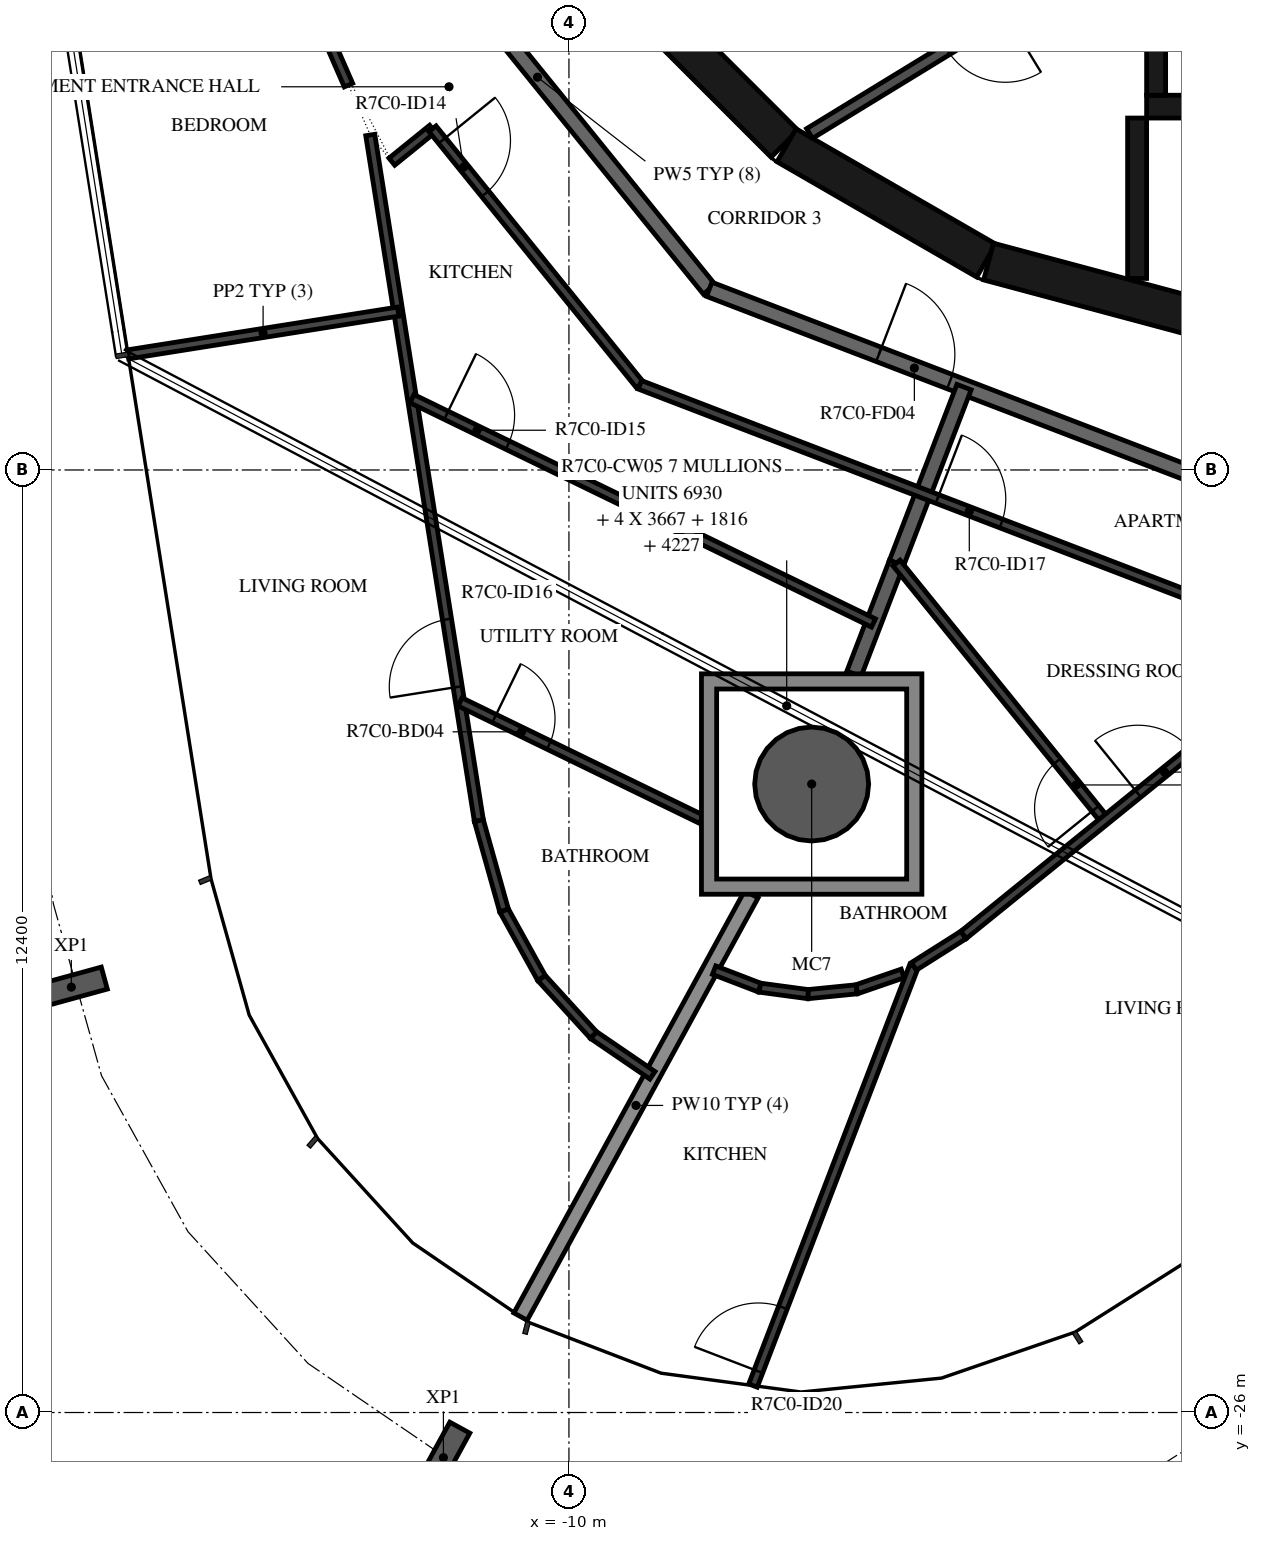
"""IFC4 building model, lengths in metres.
Left out: names, types, materials, properties, quantities, classifications, styles, units other than length and angle.
Written with IfcOpenShell. Run it as: python <this file> out.ifc"""

import sys

from ifc_helpers import new_model, si_unit, direction, frame, frame_2d, origin, origin_2d, place, context, subcontext, project, spatial, polyline, rectangle, hollow_circle, i_section, outline, extrude, element, fill, save


model = new_model("IFC4")
c1 = context("Model", 3, precision=1e-05, world=origin(), true_north=direction((0.0, 1.0)))
c2 = subcontext(c1, "Body", "Model", "MODEL_VIEW")
j1 = project(units=[si_unit("LENGTHUNIT", "METRE"), si_unit("PLANEANGLEUNIT", "RADIAN")], contexts=[c1])
p1 = place(None, origin())
s1 = spatial("IfcSite", under=j1, at=p1, CompositionType="ELEMENT")
p2 = place(p1, origin())
s2 = spatial("IfcBuilding", under=s1, at=p2, CompositionType="ELEMENT")
p3 = place(p2, frame((0.0, 0.0, 284.4)))
s3 = spatial("IfcBuildingStorey", under=s2, at=p3, CompositionType="ELEMENT", Elevation=284.4)
p4 = place(p3, frame((-6.807, -17.732, -0.38), z_axis=(0.0, 0.0, 1.0), x_axis=(1.0, 0.0, 0.0)))
e1 = element("IfcColumn", 1, at=p4, inside=s3, PredefinedType="COLUMN", context=c2, shape_type="SweptSolid", body=[
    extrude(hollow_circle(Radius=0.75, WallThickness=0.035, at=origin_2d()), origin(), (0.0, 0.0, 1.0), 3.5),
])
for number, where, z_axis, x_axis in (
    (2, (-16.547, -20.404, -0.38), (0.0, 0.0, 1.0), (-0.265, 0.964, 0.0)),
    (3, (-11.652, -26.594, -0.38), (0.0, 0.0, 1.0), (-0.877, 0.48, 0.0)),
):
    element("IfcColumn", number, at=place(p3, frame(where, z_axis=z_axis, x_axis=x_axis)), inside=s3, PredefinedType="COLUMN", context=c2, shape_type="SweptSolid", body=[
        extrude(i_section(OverallWidth=0.3, OverallDepth=0.9, WebThickness=0.019, FlangeThickness=0.035, FilletRadius=0.03, at=origin_2d()), origin(), (0.0, 0.0, 1.0), 3.5),
    ])
p5 = place(p3, frame((-9.308, -7.164, 0.0), z_axis=(0.0, 0.0, 1.0), x_axis=(0.707106781187, -0.707106781187, 0.0)))
e4 = element("IfcWall", 4, at=p5, inside=s3, PredefinedType="SHEAR", context=c2, shape_type="SweptSolid", body=[
    extrude(rectangle(XDim=3.032, YDim=0.5, at=frame_2d((1.516, 0.0))), origin(), (0.0, 0.0, 1.0), 3.12),
])
for number, where, z_axis, x_axis in (
    (5, (-7.137, -9.329, 0.0), (0.0, 0.0, 1.0), (0.866, -0.5, 0.0)),
    (6, (-4.479, -10.858, 0.0), (0.0, 0.0, 1.0), (0.966, -0.259, 0.0)),
):
    element("IfcWall", number, at=place(p3, frame(where, z_axis=z_axis, x_axis=x_axis)), inside=s3, PredefinedType="SHEAR", context=c2, shape_type="SweptSolid", body=[
        extrude(rectangle(XDim=3.033, YDim=0.5, at=frame_2d((1.516, 0.0))), origin(), (0.0, 0.0, 1.0), 3.12),
    ])
p6 = place(p3, frame((-2.275, -8.67, 0.0), z_axis=(0.0, 0.0, 1.0), x_axis=(0.0, 1.0, 0.0)))
e7 = element("IfcWall", 7, at=p6, inside=s3, PredefinedType="SHEAR", context=c2, shape_type="SweptSolid", body=[
    extrude(rectangle(XDim=3.32, YDim=0.25, at=frame_2d((1.66, 0.0))), origin(), (0.0, 0.0, 1.0), 3.12),
])
p7 = place(p3, frame((-2.4, -8.82, 0.0), z_axis=(0.0, 0.0, 1.0), x_axis=(1.0, 0.0, 0.0)))
e8 = element("IfcWall", 8, at=p7, inside=s3, PredefinedType="SHEAR", context=c2, shape_type="SweptSolid", body=[
    extrude(rectangle(XDim=2.5, YDim=0.3, at=frame_2d((1.25, 0.0))), origin(), (0.0, 0.0, 1.0), 3.12),
])
p8 = place(p7, frame((0.65, 0.0, 0.0)))
e9 = element("IfcOpeningElement", 9, at=p8, cuts=e8, PredefinedType="OPENING", context=c2, shape_type="SweptSolid", body=[
    extrude(rectangle(XDim=1.2, YDim=2.1, at=frame_2d((0.6, 1.05))), frame((0.0, 0.16, 0.0), z_axis=(0.0, -1.0, 0.0), x_axis=(1.0, 0.0, 0.0)), (0.0, 0.0, 1.0), 0.32),
])
p9 = place(p3, frame((-2.525, -8.97, 0.0), z_axis=(0.0, 0.0, 1.0), x_axis=(0.0, -1.0, 0.0)))
e10 = element("IfcWall", 10, at=p9, inside=s3, PredefinedType="SHEAR", context=c2, shape_type="SweptSolid", body=[
    extrude(rectangle(XDim=2.11, YDim=0.25, at=frame_2d((1.055, 0.0))), origin(), (0.0, 0.0, 1.0), 3.12),
])
p10 = place(p3, frame((-2.451, -6.495, 0.0), z_axis=(0.0, 0.0, 1.0), x_axis=(-0.853250115418, -0.521501908471, 0.0)))
e11 = element("IfcWall", 11, at=p10, inside=s3, PredefinedType="PARTITIONING", context=c2, shape_type="SweptSolid", body=[
    extrude(rectangle(XDim=5.137, YDim=0.15, at=frame_2d((2.569, 0.0))), origin(), (0.0, 0.0, 1.0), 3.12),
])
p11 = place(p10, frame((2.119, 0.0, 0.0)))
e12 = element("IfcOpeningElement", 12, at=p11, cuts=e11, PredefinedType="OPENING", context=c2, shape_type="SweptSolid", body=[
    extrude(rectangle(XDim=0.9, YDim=2.1, at=frame_2d((0.45, 1.05))), frame((0.0, 0.085, 0.0), z_axis=(0.0, -1.0, 0.0), x_axis=(1.0, 0.0, 0.0)), (0.0, 0.0, 1.0), 0.17),
])
p12 = place(p3, frame((-12.673, -5.643, 0.0), z_axis=(0.0, 0.0, 1.0), x_axis=(0.629302871585, -0.777160148113, 0.0)))
e13 = element("IfcWall", 13, at=p12, inside=s3, PredefinedType="STANDARD", context=c2, shape_type="SweptSolid", body=[
    extrude(rectangle(XDim=7.181, YDim=0.2, at=frame_2d((3.59, 0.0))), origin(), (0.0, 0.0, 1.0), 3.12),
])
p13 = place(p3, frame((-8.154, -11.223, 0.0), z_axis=(0.0, 0.0, 1.0), x_axis=(0.93359073609, -0.358341090983, 0.0)))
e14 = element("IfcWall", 14, at=p13, inside=s3, PredefinedType="STANDARD", context=c2, shape_type="SweptSolid", body=[
    extrude(rectangle(XDim=7.181, YDim=0.2, at=frame_2d((3.59, 0.0))), origin(), (0.0, 0.0, 1.0), 3.12),
])
p14 = place(p13, frame((2.39, 0.0, 0.0)))
e15 = element("IfcOpeningElement", 15, at=p14, cuts=e14, PredefinedType="OPENING", context=c2, shape_type="SweptSolid", body=[
    extrude(rectangle(XDim=1.0, YDim=2.1, at=frame_2d((0.5, 1.05))), frame((0.0, 0.11, 0.0), z_axis=(0.0, -1.0, 0.0), x_axis=(1.0, 0.0, 0.0)), (0.0, 0.0, 1.0), 0.22),
])
p15 = place(p3, frame((-5.69, -14.824, 0.0), z_axis=(0.0, 0.0, 1.0), x_axis=(0.358345342952, 0.933589104041, 0.0)))
e16 = element("IfcWall", 16, at=p15, inside=s3, PredefinedType="STANDARD", context=c2, shape_type="SweptSolid", body=[
    extrude(rectangle(XDim=2.479, YDim=0.2, at=frame_2d((1.239, 0.0))), origin(), (0.0, 0.0, 1.0), 3.12),
])
p16 = place(p3, frame((-6.25, -16.282, 0.0), z_axis=(0.0, 0.0, 1.0), x_axis=(0.358360842469, 0.933583154617, 0.0)))
e17 = element("IfcWall", 17, at=p16, inside=s3, PredefinedType="STANDARD", context=c2, shape_type="SweptSolid", body=[
    extrude(rectangle(XDim=1.562, YDim=0.2, at=frame_2d((0.781, 0.0))), origin(), (0.0, 0.0, 1.0), 3.12),
])
p17 = place(p3, frame((-10.637, -24.738, 0.0), z_axis=(0.0, 0.0, 1.0), x_axis=(0.479683887596, 0.877441375808, 0.0)))
e18 = element("IfcWall", 18, at=p17, inside=s3, PredefinedType="STANDARD", context=c2, shape_type="SweptSolid", body=[
    extrude(rectangle(XDim=6.333, YDim=0.2, at=frame_2d((3.166, 0.0))), origin(), (0.0, 0.0, 1.0), 2.73),
])
p18 = place(p3, frame((-13.132, -8.006, 0.0), z_axis=(0.0, 0.0, 1.0), x_axis=(0.400176548656, -0.916438066596, 0.0)))
e19 = element("IfcWall", 19, at=p18, inside=s3, PredefinedType="PARTITIONING", context=c2, shape_type="SweptSolid", body=[
    extrude(rectangle(XDim=0.578, YDim=0.12, at=frame_2d((0.289, 0.0))), origin(), (0.0, 0.0, 1.0), 3.12),
])
p19 = place(p3, frame((-12.33, -9.544, 0.0), z_axis=(0.0, 0.0, 1.0), x_axis=(0.777046524115, 0.629443166109, 0.0)))
e20 = element("IfcWall", 20, at=p19, inside=s3, PredefinedType="PARTITIONING", context=c2, shape_type="SweptSolid", body=[
    extrude(rectangle(XDim=0.688, YDim=0.12, at=frame_2d((0.344, 0.0))), origin(), (0.0, 0.0, 1.0), 3.12),
])
p20 = place(p3, frame((-11.795, -9.111, 0.0), z_axis=(0.0, 0.0, 1.0), x_axis=(0.62936834401, -0.777107127466, 0.0)))
e21 = element("IfcWall", 21, at=p20, inside=s3, PredefinedType="PARTITIONING", context=c2, shape_type="SweptSolid", body=[
    extrude(rectangle(XDim=4.334, YDim=0.12, at=frame_2d((2.167, 0.0))), origin(), (0.0, 0.0, 1.0), 3.12),
])
p21 = place(p20, frame((0.2, 0.0, 0.0)))
e22 = element("IfcOpeningElement", 22, at=p21, cuts=e21, PredefinedType="OPENING", context=c2, shape_type="SweptSolid", body=[
    extrude(rectangle(XDim=0.9, YDim=2.1, at=frame_2d((0.45, 1.05))), frame((0.0, 0.07, 0.0), z_axis=(0.0, -1.0, 0.0), x_axis=(1.0, 0.0, 0.0)), (0.0, 0.0, 1.0), 0.14),
])
p22 = place(p3, frame((-9.067, -12.479, 0.0), z_axis=(0.0, 0.0, 1.0), x_axis=(0.933579449035, -0.358370495911, 0.0)))
e23 = element("IfcWall", 23, at=p22, inside=s3, PredefinedType="PARTITIONING", context=c2, shape_type="SweptSolid", body=[
    extrude(rectangle(XDim=7.985, YDim=0.12, at=frame_2d((3.992, 0.0))), origin(), (0.0, 0.0, 1.0), 3.12),
])
p23 = place(p22, frame((4.192, 0.0, 0.0)))
e24 = element("IfcOpeningElement", 24, at=p23, cuts=e23, PredefinedType="OPENING", context=c2, shape_type="SweptSolid", body=[
    extrude(rectangle(XDim=0.9, YDim=2.1, at=frame_2d((0.45, 1.05))), frame((0.0, 0.07, 0.0), z_axis=(0.0, -1.0, 0.0), x_axis=(1.0, 0.0, 0.0)), (0.0, 0.0, 1.0), 0.14),
])
p24 = place(p3, frame((-11.185, -18.213, 0.0), z_axis=(0.0, 0.0, 1.0), x_axis=(-0.15642108221, 0.987690460134, 0.0)))
e25 = element("IfcWall", 25, at=p24, inside=s3, PredefinedType="PARTITIONING", context=c2, shape_type="SweptSolid", body=[
    extrude(rectangle(XDim=9.132, YDim=0.12, at=frame_2d((4.566, 0.0))), origin(), (0.0, 0.0, 1.0), 3.12),
])
p25 = place(p24, frame((1.781, 0.0, 0.0)))
e26 = element("IfcOpeningElement", 26, at=p25, cuts=e25, PredefinedType="OPENING", context=c2, shape_type="SweptSolid", body=[
    extrude(rectangle(XDim=0.9, YDim=2.1, at=frame_2d((0.45, 1.05))), frame((0.0, 0.07, 0.0), z_axis=(0.0, -1.0, 0.0), x_axis=(1.0, 0.0, 0.0)), (0.0, 0.0, 1.0), 0.14),
])
p26 = place(p3, frame((-15.802, -12.08, 0.0), z_axis=(0.0, 0.0, 1.0), x_axis=(0.987685312069, 0.156453585206, 0.0)))
e27 = element("IfcWall", 27, at=p26, inside=s3, PredefinedType="PARTITIONING", context=c2, shape_type="SweptSolid", body=[
    extrude(rectangle(XDim=3.6, YDim=0.12, at=frame_2d((1.8, 0.0))), origin(), (0.0, 0.0, 1.0), 2.73),
])
p27 = place(p3, frame((-12.064, -12.662, 0.0), z_axis=(0.0, 0.0, 1.0), x_axis=(0.899383852228, -0.437159794985, 0.0)))
e28 = element("IfcWall", 28, at=p27, inside=s3, PredefinedType="PARTITIONING", context=c2, shape_type="SweptSolid", body=[
    extrude(rectangle(XDim=6.75, YDim=0.12, at=frame_2d((3.375, 0.0))), origin(), (0.0, 0.0, 1.0), 3.12),
])
p28 = place(p27, frame((0.5, 0.0, 0.0)))
e29 = element("IfcOpeningElement", 29, at=p28, cuts=e28, PredefinedType="OPENING", context=c2, shape_type="SweptSolid", body=[
    extrude(rectangle(XDim=0.9, YDim=2.1, at=frame_2d((0.45, 1.05))), frame((0.0, 0.07, 0.0), z_axis=(0.0, -1.0, 0.0), x_axis=(1.0, 0.0, 0.0)), (0.0, 0.0, 1.0), 0.14),
])
p29 = place(p3, frame((-8.902, -21.564, 0.0), z_axis=(0.0, 0.0, 1.0), x_axis=(-0.825676933813, 0.56414324508, 0.0)))
e30 = element("IfcWall", 30, at=p29, inside=s3, PredefinedType="PARTITIONING", context=c2, shape_type="SweptSolid", body=[
    extrude(rectangle(XDim=0.939, YDim=0.12, at=frame_2d((0.47, 0.0))), origin(), (0.0, 0.0, 1.0), 3.12),
])
for number, where, z_axis, x_axis in (
    (31, (-9.677, -21.034, 0.0), (0.0, 0.0, 1.0), (-0.674, 0.739, 0.0)),
    (32, (-10.361, -20.283, 0.0), (0.0, 0.0, 1.0), (-0.485, 0.875, 0.0)),
):
    element("IfcWall", number, at=place(p3, frame(where, z_axis=z_axis, x_axis=x_axis)), inside=s3, PredefinedType="PARTITIONING", context=c2, shape_type="SweptSolid", body=[
        extrude(rectangle(XDim=1.016, YDim=0.12, at=frame_2d((0.508, 0.0))), origin(), (0.0, 0.0, 1.0), 3.12),
    ])
p30 = place(p3, frame((-10.854, -19.394, 0.0), z_axis=(0.0, 0.0, 1.0), x_axis=(-0.27001369034, 0.96285648309, 0.0)))
e33 = element("IfcWall", 33, at=p30, inside=s3, PredefinedType="PARTITIONING", context=c2, shape_type="SweptSolid", body=[
    extrude(rectangle(XDim=1.227, YDim=0.12, at=frame_2d((0.614, 0.0))), origin(), (0.0, 0.0, 1.0), 3.12),
])
p31 = place(p3, frame((-11.433, -16.651, 0.0), z_axis=(0.0, 0.0, 1.0), x_axis=(0.899390128806, -0.437146881731, 0.0)))
e34 = element("IfcWall", 34, at=p31, inside=s3, PredefinedType="PARTITIONING", context=c2, shape_type="SweptSolid", body=[
    extrude(rectangle(XDim=3.531, YDim=0.12, at=frame_2d((1.766, 0.0))), origin(), (0.0, 0.0, 1.0), 3.12),
])
p32 = place(p31, frame((0.5, 0.0, 0.0)))
e35 = element("IfcOpeningElement", 35, at=p32, cuts=e34, PredefinedType="OPENING", context=c2, shape_type="SweptSolid", body=[
    extrude(rectangle(XDim=0.8, YDim=2.1, at=frame_2d((0.4, 1.05))), frame((0.0, 0.07, 0.0), z_axis=(0.0, -1.0, 0.0), x_axis=(1.0, 0.0, 0.0)), (0.0, 0.0, 1.0), 0.14),
])
p33 = place(p3, frame((-5.609, -20.223, 0.0), z_axis=(0.0, 0.0, 1.0), x_axis=(-0.945401267449, -0.325908642882, 0.0)))
e36 = element("IfcWall", 36, at=p33, inside=s3, PredefinedType="PARTITIONING", context=c2, shape_type="SweptSolid", body=[
    extrude(rectangle(XDim=0.642, YDim=0.12, at=frame_2d((0.321, 0.0))), origin(), (0.0, 0.0, 1.0), 3.12),
])
for number, where, z_axis, x_axis in (
    (37, (-6.216, -20.433, 0.0), (0.0, 0.0, 1.0), (-0.995, -0.099, 0.0)),
    (38, (-6.855, -20.496, 0.0), (0.0, 0.0, 1.0), (-0.991, 0.133, 0.0)),
    (39, (-7.491, -20.41, 0.0), (0.0, 0.0, 1.0), (-0.933, 0.359, 0.0)),
):
    element("IfcWall", number, at=place(p3, frame(where, z_axis=z_axis, x_axis=x_axis)), inside=s3, PredefinedType="PARTITIONING", context=c2, shape_type="SweptSolid", body=[
        extrude(rectangle(XDim=0.642, YDim=0.12, at=frame_2d((0.321, 0.0))), origin(), (0.0, 0.0, 1.0), 3.12),
    ])
p34 = place(p3, frame((-7.579, -25.646, 0.0), z_axis=(0.0, 0.0, 1.0), x_axis=(0.358336526264, 0.933592488158, 0.0)))
e40 = element("IfcWall", 40, at=p34, inside=s3, PredefinedType="PARTITIONING", context=c2, shape_type="SweptSolid", body=[
    extrude(rectangle(XDim=5.908, YDim=0.12, at=frame_2d((2.954, 0.0))), origin(), (0.0, 0.0, 1.0), 3.12),
])
p35 = place(p34, frame((0.2, 0.0, 0.0)))
e41 = element("IfcOpeningElement", 41, at=p35, cuts=e40, PredefinedType="OPENING", context=c2, shape_type="SweptSolid", body=[
    extrude(rectangle(XDim=0.9, YDim=2.1, at=frame_2d((0.45, 1.05))), frame((0.0, 0.07, 0.0), z_axis=(0.0, -1.0, 0.0), x_axis=(1.0, 0.0, 0.0)), (0.0, 0.0, 1.0), 0.14),
])
p36 = place(p3, frame((-2.948, -18.21, 0.0), z_axis=(0.0, 0.0, 1.0), x_axis=(-0.629330389268, 0.777137864953, 0.0)))
e42 = element("IfcWall", 42, at=p36, inside=s3, PredefinedType="PARTITIONING", context=c2, shape_type="SweptSolid", body=[
    extrude(rectangle(XDim=4.357, YDim=0.12, at=frame_2d((2.179, 0.0))), origin(), (0.0, 0.0, 1.0), 3.12),
])
p37 = place(p36, frame((0.2, 0.0, 0.0)))
e43 = element("IfcOpeningElement", 43, at=p37, cuts=e42, PredefinedType="OPENING", context=c2, shape_type="SweptSolid", body=[
    extrude(rectangle(XDim=0.8, YDim=2.1, at=frame_2d((0.4, 1.05))), frame((0.0, 0.07, 0.0), z_axis=(0.0, -1.0, 0.0), x_axis=(1.0, 0.0, 0.0)), (0.0, 0.0, 1.0), 0.14),
])
p38 = place(p3, frame((-5.462, -20.13, 0.0), z_axis=(0.0, 0.0, 1.0), x_axis=(0.84494764883, 0.534849016768, 0.0)))
e44 = element("IfcWall", 44, at=p38, inside=s3, PredefinedType="PARTITIONING", context=c2, shape_type="SweptSolid", body=[
    extrude(rectangle(XDim=0.772, YDim=0.12, at=frame_2d((0.386, 0.0))), origin(), (0.0, 0.0, 1.0), 3.12),
])
p39 = place(p3, frame((-4.809, -19.717, 0.0), z_axis=(0.0, 0.0, 1.0), x_axis=(0.777140730041, 0.629326851255, 0.0)))
e45 = element("IfcWall", 45, at=p39, inside=s3, PredefinedType="PARTITIONING", context=c2, shape_type="SweptSolid", body=[
    extrude(rectangle(XDim=7.644, YDim=0.12, at=frame_2d((3.822, 0.0))), origin(), (0.0, 0.0, 1.0), 3.12),
])
p40 = place(p39, frame((2.954, 0.0, 0.0)))
e46 = element("IfcOpeningElement", 46, at=p40, cuts=e45, PredefinedType="OPENING", context=c2, shape_type="SweptSolid", body=[
    extrude(rectangle(XDim=0.9, YDim=2.1, at=frame_2d((0.45, 1.05))), frame((0.0, 0.07, 0.0), z_axis=(0.0, -1.0, 0.0), x_axis=(1.0, 0.0, 0.0)), (0.0, 0.0, 1.0), 0.14),
])
p41 = place(p3, origin())
e47 = element("IfcWall", 47, at=p41, inside=s3, PredefinedType="STANDARD", context=c2, shape_type="SweptSolid", body=[
    extrude(outline(polyline([(-5.357, -16.282), (-5.357, -19.182), (-8.257, -19.182), (-8.257, -16.282), (-5.357, -16.282)]), holes=[polyline([(-8.057, -18.982), (-5.557, -18.982), (-5.557, -16.482), (-8.057, -16.482), (-8.057, -18.982)])]), origin(), (0.0, 0.0, 1.0), 3.12),
])
p42 = place(p14, origin())
e48 = element("IfcDoor", 48, at=p42, inside=s3, OperationType="SINGLE_SWING_RIGHT", PredefinedType="DOOR", context=c2, shape_type="SweptSolid", body=[
    extrude(rectangle(XDim=1.0, YDim=2.1, at=frame_2d((0.5, 1.05))), frame((0.0, 0.025, 0.0), z_axis=(0.0, -1.0, 0.0), x_axis=(1.0, 0.0, 0.0)), (0.0, 0.0, 1.0), 0.05),
])
fill(e15, e48)
p43 = place(p21, origin())
e49 = element("IfcDoor", 49, at=p43, inside=s3, OperationType="SINGLE_SWING_RIGHT", PredefinedType="DOOR", context=c2, shape_type="SweptSolid", body=[
    extrude(rectangle(XDim=0.9, YDim=2.1, at=frame_2d((0.45, 1.05))), frame((0.0, 0.025, 0.0), z_axis=(0.0, -1.0, 0.0), x_axis=(1.0, 0.0, 0.0)), (0.0, 0.0, 1.0), 0.05),
])
fill(e22, e49)
p44 = place(p28, origin())
e50 = element("IfcDoor", 50, at=p44, inside=s3, OperationType="SINGLE_SWING_RIGHT", PredefinedType="DOOR", context=c2, shape_type="SweptSolid", body=[
    extrude(rectangle(XDim=0.9, YDim=2.1, at=frame_2d((0.45, 1.05))), frame((0.0, 0.025, 0.0), z_axis=(0.0, -1.0, 0.0), x_axis=(1.0, 0.0, 0.0)), (0.0, 0.0, 1.0), 0.05),
])
fill(e29, e50)
p45 = place(p25, origin())
e51 = element("IfcDoor", 51, at=p45, inside=s3, OperationType="SINGLE_SWING_RIGHT", PredefinedType="DOOR", context=c2, shape_type="SweptSolid", body=[
    extrude(rectangle(XDim=0.9, YDim=2.1, at=frame_2d((0.45, 1.05))), frame((0.0, 0.025, 0.0), z_axis=(0.0, -1.0, 0.0), x_axis=(1.0, 0.0, 0.0)), (0.0, 0.0, 1.0), 0.05),
])
fill(e26, e51)
p46 = place(p32, origin())
e52 = element("IfcDoor", 52, at=p46, inside=s3, OperationType="SINGLE_SWING_RIGHT", PredefinedType="DOOR", context=c2, shape_type="SweptSolid", body=[
    extrude(rectangle(XDim=0.8, YDim=2.1, at=frame_2d((0.4, 1.05))), frame((0.0, 0.025, 0.0), z_axis=(0.0, -1.0, 0.0), x_axis=(1.0, 0.0, 0.0)), (0.0, 0.0, 1.0), 0.05),
])
fill(e35, e52)
p47 = place(p23, origin())
e53 = element("IfcDoor", 53, at=p47, inside=s3, OperationType="SINGLE_SWING_RIGHT", PredefinedType="DOOR", context=c2, shape_type="SweptSolid", body=[
    extrude(rectangle(XDim=0.9, YDim=2.1, at=frame_2d((0.45, 1.05))), frame((0.0, 0.025, 0.0), z_axis=(0.0, -1.0, 0.0), x_axis=(1.0, 0.0, 0.0)), (0.0, 0.0, 1.0), 0.05),
])
fill(e24, e53)
p48 = place(p37, origin())
e54 = element("IfcDoor", 54, at=p48, inside=s3, OperationType="SINGLE_SWING_LEFT", PredefinedType="DOOR", context=c2, shape_type="SweptSolid", body=[
    extrude(rectangle(XDim=0.8, YDim=2.1, at=frame_2d((0.4, 1.05))), frame((0.0, 0.025, 0.0), z_axis=(0.0, -1.0, 0.0), x_axis=(1.0, 0.0, 0.0)), (0.0, 0.0, 1.0), 0.05),
])
fill(e43, e54)
p49 = place(p40, origin())
e55 = element("IfcDoor", 55, at=p49, inside=s3, OperationType="SINGLE_SWING_LEFT", PredefinedType="DOOR", context=c2, shape_type="SweptSolid", body=[
    extrude(rectangle(XDim=0.9, YDim=2.1, at=frame_2d((0.45, 1.05))), frame((0.0, 0.025, 0.0), z_axis=(0.0, -1.0, 0.0), x_axis=(1.0, 0.0, 0.0)), (0.0, 0.0, 1.0), 0.05),
])
fill(e46, e55)
p50 = place(p35, origin())
e56 = element("IfcDoor", 56, at=p50, inside=s3, OperationType="SINGLE_SWING_LEFT", PredefinedType="DOOR", context=c2, shape_type="SweptSolid", body=[
    extrude(rectangle(XDim=0.9, YDim=2.1, at=frame_2d((0.45, 1.05))), frame((0.0, 0.025, 0.0), z_axis=(0.0, -1.0, 0.0), x_axis=(1.0, 0.0, 0.0)), (0.0, 0.0, 1.0), 0.05),
])
fill(e41, e56)
save(model, sys.argv[1])
